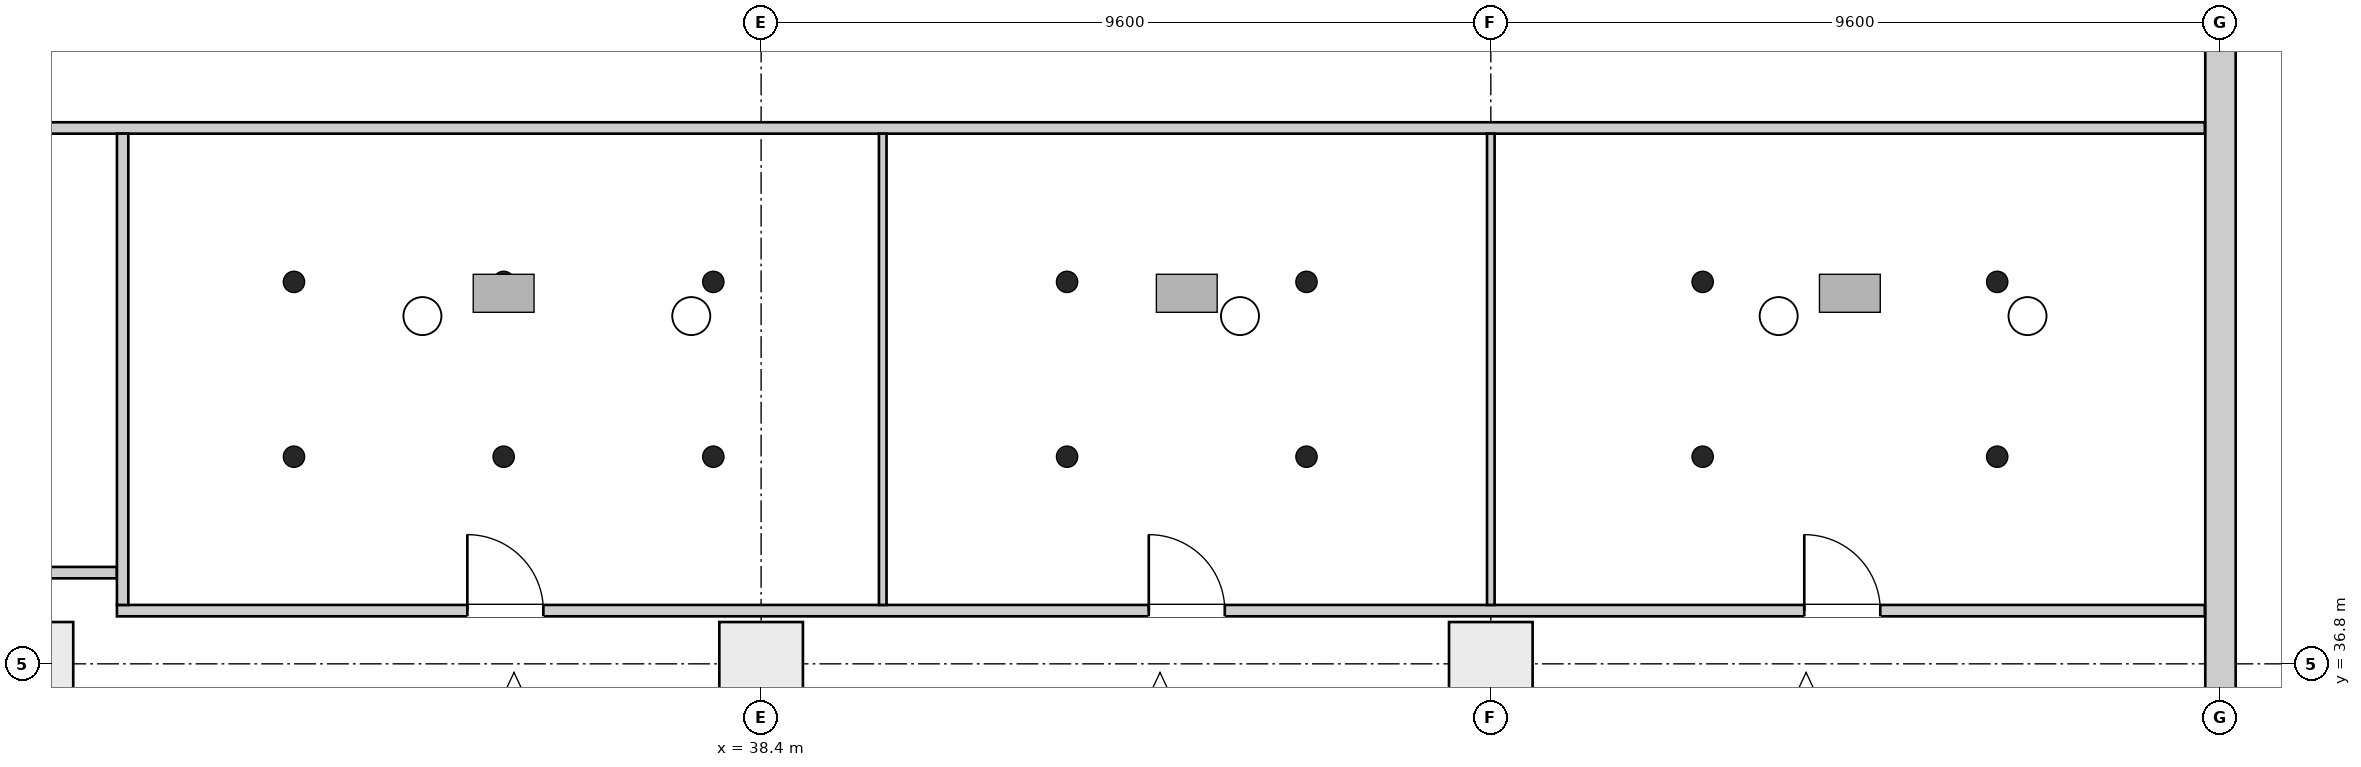
"""IFC4 building model, lengths in metres.
Left out: names, types, materials, properties, quantities, classifications, styles, units other than length and angle.
Written with IfcOpenShell. Run it as: python <this file> out.ifc"""

import sys

from ifc_helpers import new_model, si_unit, direction, frame, frame_2d, origin, origin_2d, place, context, subcontext, project, spatial, rectangle, extrude, element, fill, save


model = new_model("IFC4")
c1 = context("Model", 3, precision=1e-05, world=origin(), true_north=direction((0.0, 1.0)))
c2 = subcontext(c1, "Body", "Model", "MODEL_VIEW")
j1 = project(units=[si_unit("LENGTHUNIT", "METRE"), si_unit("PLANEANGLEUNIT", "RADIAN")], contexts=[c1])
p1 = place(None, origin())
s1 = spatial("IfcSite", under=j1, at=p1, CompositionType="ELEMENT")
p2 = place(p1, origin())
s2 = spatial("IfcBuilding", under=s1, at=p2, CompositionType="ELEMENT")
p3 = place(p2, frame((0.0, 0.0, 26.7)))
s3 = spatial("IfcBuildingStorey", under=s2, at=p3, CompositionType="ELEMENT", Elevation=26.7)
p4 = place(p3, frame((57.6, -0.2, 0.0), z_axis=(0.0, 0.0, 1.0), x_axis=(0.0, 1.0, 0.0)))
e1 = element("IfcWall", 1, at=p4, inside=s3, PredefinedType="SHEAR", context=c2, shape_type="SweptSolid", body=[
    extrude(rectangle(XDim=46.88, YDim=0.4, at=frame_2d((23.44, 0.0))), origin(), (0.0, 0.0, 1.0), 5.2),
])
for number, where, z_axis, x_axis in (
    (2, (28.8, 36.8, 0.0), (0.0, 0.0, 1.0), (1.0, 0.0, 0.0)),
    (3, (38.4, 36.8, 0.0), (0.0, 0.0, 1.0), (1.0, 0.0, 0.0)),
    (4, (48.0, 36.8, 0.0), (0.0, 0.0, 1.0), (1.0, 0.0, 0.0)),
):
    element("IfcColumn", number, at=place(p3, frame(where, z_axis=z_axis, x_axis=x_axis)), inside=s3, PredefinedType="COLUMN", context=c2, shape_type="SweptSolid", body=[
        extrude(rectangle(XDim=1.1, YDim=1.1, at=origin_2d()), origin(), (0.0, 0.0, 1.0), 5.2),
    ])
p5 = place(p3, frame((28.006, 38.0, 0.0), z_axis=(0.0, 0.0, 1.0), x_axis=(1.0, 0.0, 0.0)))
e5 = element("IfcWall", 5, at=p5, inside=s3, PredefinedType="PARTITIONING", context=c2, shape_type="SweptSolid", body=[
    extrude(rectangle(XDim=1.919, YDim=0.15, at=frame_2d((0.959, 0.0))), origin(), (0.0, 0.0, 1.0), 4.85),
])
p6 = place(p3, frame((28.006, 43.85, 0.0), z_axis=(0.0, 0.0, 1.0), x_axis=(1.0, 0.0, 0.0)))
e6 = element("IfcWall", 6, at=p6, inside=s3, PredefinedType="PARTITIONING", context=c2, shape_type="SweptSolid", body=[
    extrude(rectangle(XDim=29.388, YDim=0.15, at=frame_2d((14.694, 0.0))), origin(), (0.0, 0.0, 1.0), 4.85),
])
p7 = place(p3, frame((29.925, 37.5, 0.0), z_axis=(0.0, 0.0, 1.0), x_axis=(1.0, 0.0, 0.0)))
e7 = element("IfcWall", 7, at=p7, inside=s3, PredefinedType="PARTITIONING", context=c2, shape_type="SweptSolid", body=[
    extrude(rectangle(XDim=27.469, YDim=0.15, at=frame_2d((13.734, 0.0))), origin(), (0.0, 0.0, 1.0), 4.85),
])
p8 = place(p7, frame((4.61, 0.0, 0.0)))
e8 = element("IfcOpeningElement", 8, at=p8, cuts=e7, PredefinedType="OPENING", context=c2, shape_type="SweptSolid", body=[
    extrude(rectangle(XDim=1.0, YDim=2.1, at=frame_2d((0.5, 1.05))), frame((0.0, 0.085, 0.0), z_axis=(0.0, -1.0, 0.0), x_axis=(1.0, 0.0, 0.0)), (0.0, 0.0, 1.0), 0.17),
])
p9 = place(p7, frame((13.575, 0.0, 0.0)))
e9 = element("IfcOpeningElement", 9, at=p9, cuts=e7, PredefinedType="OPENING", context=c2, shape_type="SweptSolid", body=[
    extrude(rectangle(XDim=1.0, YDim=2.1, at=frame_2d((0.5, 1.05))), frame((0.0, 0.085, 0.0), z_axis=(0.0, -1.0, 0.0), x_axis=(1.0, 0.0, 0.0)), (0.0, 0.0, 1.0), 0.17),
])
p10 = place(p7, frame((22.199, 0.0, 0.0)))
e10 = element("IfcOpeningElement", 10, at=p10, cuts=e7, PredefinedType="OPENING", context=c2, shape_type="SweptSolid", body=[
    extrude(rectangle(XDim=1.0, YDim=2.1, at=frame_2d((0.5, 1.05))), frame((0.0, 0.085, 0.0), z_axis=(0.0, -1.0, 0.0), x_axis=(1.0, 0.0, 0.0)), (0.0, 0.0, 1.0), 0.17),
])
p11 = place(p3, frame((30.0, 37.575, 0.0), z_axis=(0.0, 0.0, 1.0), x_axis=(0.0, 1.0, 0.0)))
e11 = element("IfcWall", 11, at=p11, inside=s3, PredefinedType="PARTITIONING", context=c2, shape_type="SweptSolid", body=[
    extrude(rectangle(XDim=6.2, YDim=0.15, at=frame_2d((3.1, 0.0))), origin(), (0.0, 0.0, 1.0), 4.85),
])
for number, where, z_axis, x_axis in (
    (12, (40.0, 37.575, 0.0), (0.0, 0.0, 1.0), (0.0, 1.0, 0.0)),
    (13, (48.0, 37.575, 0.0), (0.0, 0.0, 1.0), (0.0, 1.0, 0.0)),
):
    element("IfcWall", number, at=place(p3, frame(where, z_axis=z_axis, x_axis=x_axis)), inside=s3, PredefinedType="PARTITIONING", context=c2, shape_type="SweptSolid", body=[
        extrude(rectangle(XDim=6.2, YDim=0.1, at=frame_2d((3.1, 0.0))), origin(), (0.0, 0.0, 1.0), 4.85),
    ])
p12 = place(p8, origin())
e14 = element("IfcDoor", 14, at=p12, inside=s3, OperationType="SINGLE_SWING_LEFT", PredefinedType="DOOR", context=c2, shape_type="SweptSolid", body=[
    extrude(rectangle(XDim=1.0, YDim=2.1, at=frame_2d((0.5, 1.05))), frame((0.0, 0.025, 0.0), z_axis=(0.0, -1.0, 0.0), x_axis=(1.0, 0.0, 0.0)), (0.0, 0.0, 1.0), 0.05),
])
fill(e8, e14)
p13 = place(p9, origin())
e15 = element("IfcDoor", 15, at=p13, inside=s3, OperationType="SINGLE_SWING_RIGHT", PredefinedType="DOOR", context=c2, shape_type="SweptSolid", body=[
    extrude(rectangle(XDim=1.0, YDim=2.1, at=frame_2d((0.5, 1.05))), frame((0.0, 0.025, 0.0), z_axis=(0.0, -1.0, 0.0), x_axis=(1.0, 0.0, 0.0)), (0.0, 0.0, 1.0), 0.05),
])
fill(e9, e15)
p14 = place(p10, origin())
e16 = element("IfcDoor", 16, at=p14, inside=s3, OperationType="SINGLE_SWING_RIGHT", PredefinedType="DOOR", context=c2, shape_type="SweptSolid", body=[
    extrude(rectangle(XDim=1.0, YDim=2.1, at=frame_2d((0.5, 1.05))), frame((0.0, 0.025, 0.0), z_axis=(0.0, -1.0, 0.0), x_axis=(1.0, 0.0, 0.0)), (0.0, 0.0, 1.0), 0.05),
])
fill(e10, e16)
save(model, sys.argv[1])
